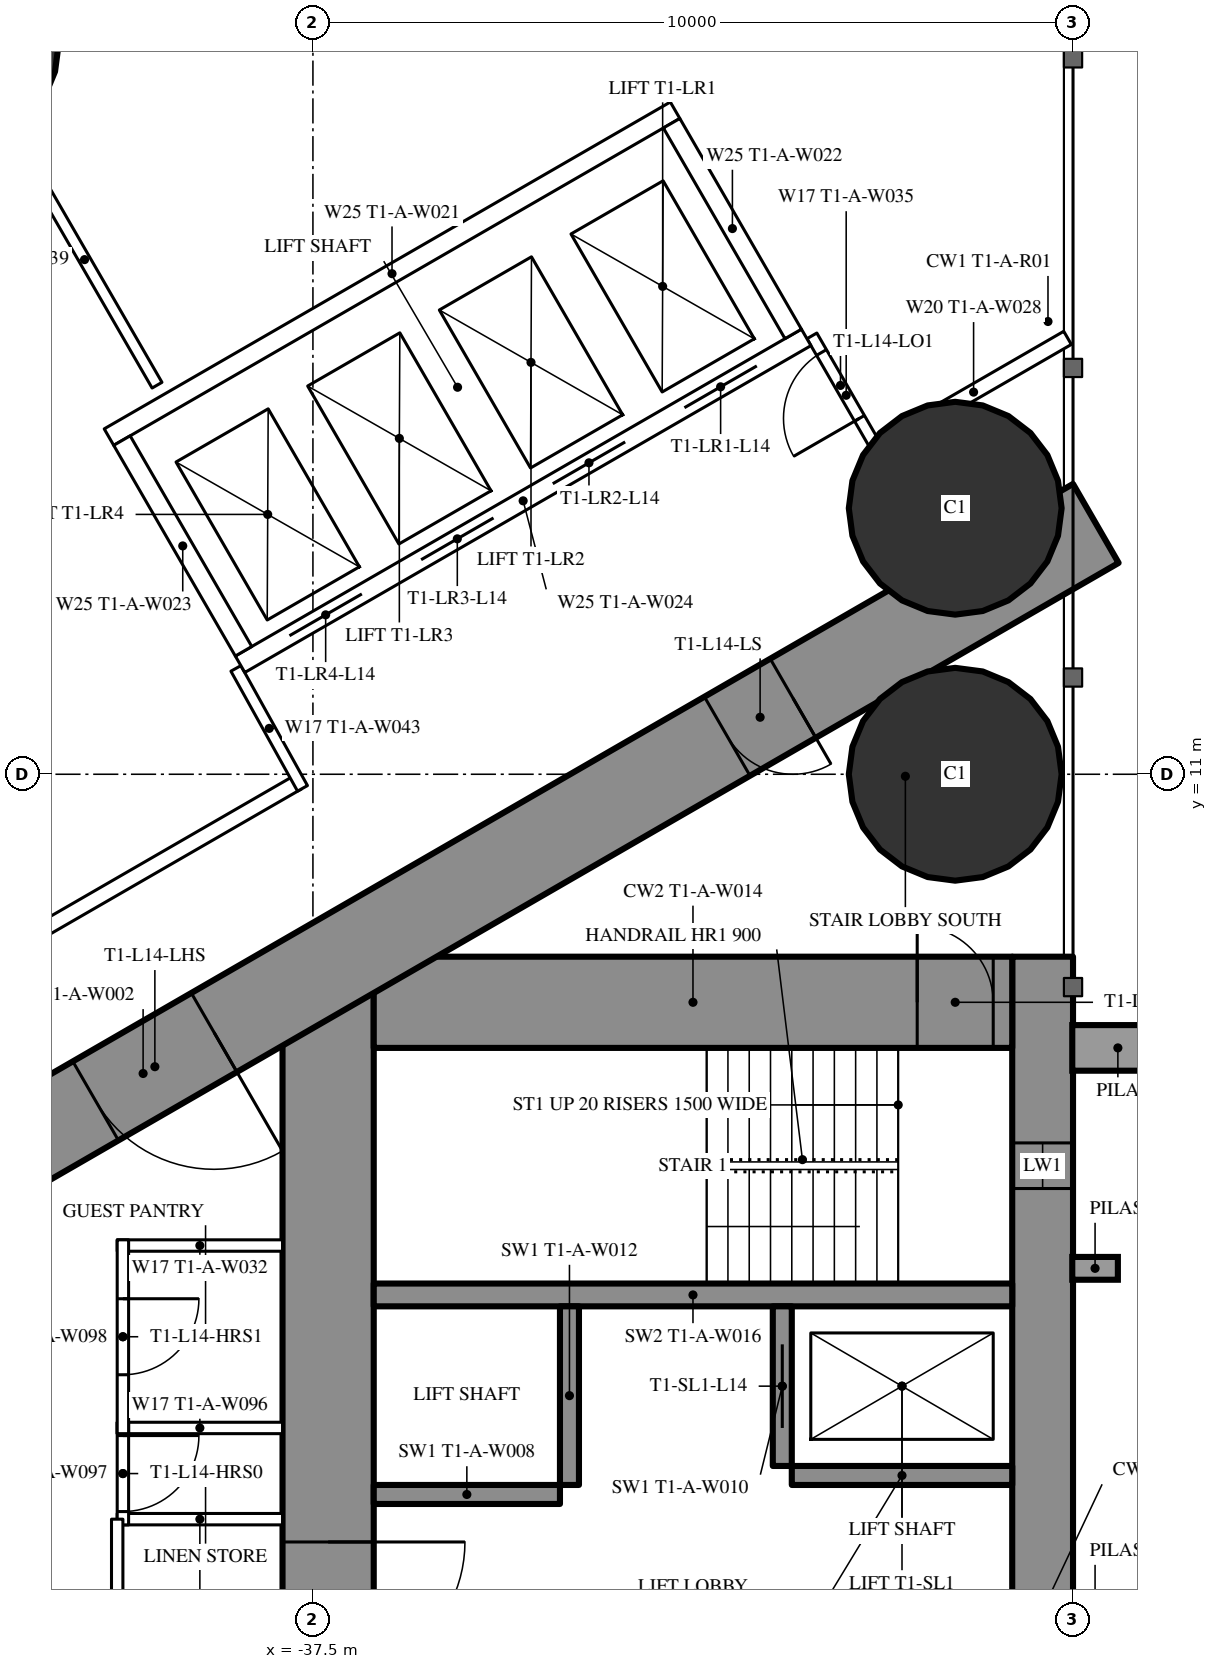
"""IFC4 building model, lengths in metres.
Left out: names, types, materials, properties, quantities, classifications, styles, units other than length and angle.
Written with IfcOpenShell. Run it as: python <this file> out.ifc"""

import sys

from ifc_helpers import new_model, si_unit, direction, frame, frame_2d, origin, origin_2d, place, context, subcontext, project, spatial, rectangle, hollow_circle, extrude, element, fill, save


model = new_model("IFC4")
c1 = context("Model", 3, precision=1e-05, world=origin(), true_north=direction((0.0, 1.0)))
c2 = subcontext(c1, "Body", "Model", "MODEL_VIEW")
j1 = project(units=[si_unit("LENGTHUNIT", "METRE"), si_unit("PLANEANGLEUNIT", "RADIAN")], contexts=[c1])
p1 = place(None, origin())
s1 = spatial("IfcSite", under=j1, at=p1, CompositionType="ELEMENT")
p2 = place(p1, origin())
s2 = spatial("IfcBuilding", under=s1, at=p2, CompositionType="ELEMENT")
p3 = place(p2, frame((0.0, 0.0, 56.5)))
s3 = spatial("IfcBuildingStorey", under=s2, at=p3, CompositionType="ELEMENT", Elevation=56.5)
for number, where, z_axis, x_axis in (
    (1, (-29.05, 11.0, 0.0), (0.0, 0.0, 1.0), (1.0, 0.0, 0.0)),
    (2, (-29.05, 14.5, 0.0), (0.0, 0.0, 1.0), (1.0, 0.0, 0.0)),
    (3, (-42.245, 20.607, 0.0), (0.0, 0.0, 1.0), (1.0, 0.0, 0.0)),
):
    element("IfcColumn", number, at=place(p3, frame(where, z_axis=z_axis, x_axis=x_axis)), inside=s3, PredefinedType="COLUMN", context=c2, shape_type="SweptSolid", body=[
        extrude(hollow_circle(Radius=1.4, WallThickness=0.12, at=origin_2d()), origin(), (0.0, 0.0, 1.0), 3.5),
    ])
p4 = place(p3, frame((-27.9, 8.6, 0.0), z_axis=(0.0, 0.0, 1.0), x_axis=(0.0, -1.0, 0.0)))
e4 = element("IfcWall", 4, at=p4, inside=s3, PredefinedType="SHEAR", context=c2, shape_type="SweptSolid", body=[
    extrude(rectangle(XDim=17.2, YDim=0.8, at=frame_2d((8.6, 0.0))), origin(), (0.0, 0.0, 1.0), 3.5),
])
p5 = place(p4, frame((2.45, 0.0, 0.6)))
e5 = element("IfcOpeningElement", 5, at=p5, cuts=e4, PredefinedType="OPENING", context=c2, shape_type="SweptSolid", body=[
    extrude(rectangle(XDim=0.6, YDim=2.1, at=frame_2d((0.3, 1.05))), frame((0.0, 0.41, 0.0), z_axis=(0.0, -1.0, 0.0), x_axis=(1.0, 0.0, 0.0)), (0.0, 0.0, 1.0), 0.82),
])
p6 = place(p4, frame((14.15, 0.0, 0.6)))
e6 = element("IfcOpeningElement", 6, at=p6, cuts=e4, PredefinedType="OPENING", context=c2, shape_type="SweptSolid", body=[
    extrude(rectangle(XDim=0.6, YDim=2.1, at=frame_2d((0.3, 1.05))), frame((0.0, 0.41, 0.0), z_axis=(0.0, -1.0, 0.0), x_axis=(1.0, 0.0, 0.0)), (0.0, 0.0, 1.0), 0.82),
])
p7 = place(p3, frame((-37.3, 8.6, 0.0), z_axis=(0.0, 0.0, 1.0), x_axis=(0.0, -1.0, 0.0)))
e7 = element("IfcWall", 7, at=p7, inside=s3, PredefinedType="SHEAR", context=c2, shape_type="SweptSolid", body=[
    extrude(rectangle(XDim=17.2, YDim=1.2, at=frame_2d((8.6, 0.0))), origin(), (0.0, 0.0, 1.0), 3.5),
])
p8 = place(p7, frame((7.7, 0.0, 0.0)))
e8 = element("IfcOpeningElement", 8, at=p8, cuts=e7, PredefinedType="OPENING", context=c2, shape_type="SweptSolid", body=[
    extrude(rectangle(XDim=1.8, YDim=2.2, at=frame_2d((0.9, 1.1))), frame((0.0, 0.61, 0.0), z_axis=(0.0, -1.0, 0.0), x_axis=(1.0, 0.0, 0.0)), (0.0, 0.0, 1.0), 1.22),
])
p9 = place(p3, frame((-28.3, 8.0, 0.0), z_axis=(0.0, 0.0, 1.0), x_axis=(-1.0, 0.0, 0.0)))
e9 = element("IfcWall", 9, at=p9, inside=s3, PredefinedType="SHEAR", context=c2, shape_type="SweptSolid", body=[
    extrude(rectangle(XDim=8.4, YDim=1.2, at=frame_2d((4.2, 0.0))), origin(), (0.0, 0.0, 1.0), 3.5),
])
p10 = place(p9, frame((0.25, 0.0, 0.0)))
e10 = element("IfcOpeningElement", 10, at=p10, cuts=e9, PredefinedType="OPENING", context=c2, shape_type="SweptSolid", body=[
    extrude(rectangle(XDim=1.0, YDim=2.2, at=frame_2d((0.5, 1.1))), frame((0.0, 0.61, 0.0), z_axis=(0.0, -1.0, 0.0), x_axis=(1.0, 0.0, 0.0)), (0.0, 0.0, 1.0), 1.22),
])
p11 = place(p3, frame((-28.3, 4.15, 0.0), z_axis=(0.0, 0.0, 1.0), x_axis=(-1.0, 0.0, 0.0)))
e11 = element("IfcWall", 11, at=p11, inside=s3, PredefinedType="SHEAR", context=c2, shape_type="SweptSolid", body=[
    extrude(rectangle(XDim=8.4, YDim=0.3, at=frame_2d((4.2, 0.0))), origin(), (0.0, 0.0, 1.0), 3.5),
])
p12 = place(p3, frame((-31.325, 4.0, 0.0), z_axis=(0.0, 0.0, 1.0), x_axis=(0.0, -1.0, 0.0)))
e12 = element("IfcWall", 12, at=p12, inside=s3, PredefinedType="SHEAR", context=c2, shape_type="SweptSolid", body=[
    extrude(rectangle(XDim=2.1, YDim=0.25, at=frame_2d((1.05, 0.0))), origin(), (0.0, 0.0, 1.0), 3.5),
])
p13 = place(p12, frame((0.5, 0.0, 0.0)))
e13 = element("IfcOpeningElement", 13, at=p13, cuts=e12, PredefinedType="OPENING", context=c2, shape_type="SweptSolid", body=[
    extrude(rectangle(XDim=1.1, YDim=2.2, at=frame_2d((0.55, 1.1))), frame((0.0, 0.135, 0.0), z_axis=(0.0, -1.0, 0.0), x_axis=(1.0, 0.0, 0.0)), (0.0, 0.0, 1.0), 0.27),
])
p14 = place(p3, frame((-34.125, 4.0, 0.0), z_axis=(0.0, 0.0, 1.0), x_axis=(0.0, -1.0, 0.0)))
e14 = element("IfcWall", 14, at=p14, inside=s3, PredefinedType="SHEAR", context=c2, shape_type="SweptSolid", body=[
    extrude(rectangle(XDim=2.35, YDim=0.25, at=frame_2d((1.175, 0.0))), origin(), (0.0, 0.0, 1.0), 3.5),
])
p15 = place(p3, frame((-28.3, 1.775, 0.0), z_axis=(0.0, 0.0, 1.0), x_axis=(-1.0, 0.0, 0.0)))
e15 = element("IfcWall", 15, at=p15, inside=s3, PredefinedType="SHEAR", context=c2, shape_type="SweptSolid", body=[
    extrude(rectangle(XDim=2.9, YDim=0.25, at=frame_2d((1.45, 0.0))), origin(), (0.0, 0.0, 1.0), 3.5),
])
p16 = place(p3, frame((-34.25, 1.525, 0.0), z_axis=(0.0, 0.0, 1.0), x_axis=(-1.0, 0.0, 0.0)))
e16 = element("IfcWall", 16, at=p16, inside=s3, PredefinedType="SHEAR", context=c2, shape_type="SweptSolid", body=[
    extrude(rectangle(XDim=2.45, YDim=0.25, at=frame_2d((1.225, 0.0))), origin(), (0.0, 0.0, 1.0), 3.5),
])
p17 = place(p3, frame((-27.2, 14.3, 0.0), z_axis=(0.0, 0.0, 1.0), x_axis=(-0.866026593062, -0.499997940104, 0.0)))
e17 = element("IfcWall", 17, at=p17, inside=s3, PredefinedType="SHEAR", context=c2, shape_type="SweptSolid", body=[
    extrude(rectangle(XDim=28.946, YDim=1.2, at=frame_2d((14.473, 0.0))), origin(), (0.0, 0.0, 1.0), 3.5),
])
p18 = place(p17, frame((4.6, 0.0, 0.0)))
e18 = element("IfcOpeningElement", 18, at=p18, cuts=e17, PredefinedType="OPENING", context=c2, shape_type="SweptSolid", body=[
    extrude(rectangle(XDim=1.0, YDim=2.2, at=frame_2d((0.5, 1.1))), frame((0.0, 0.61, 0.0), z_axis=(0.0, -1.0, 0.0), x_axis=(1.0, 0.0, 0.0)), (0.0, 0.0, 1.0), 1.22),
])
p19 = place(p17, frame((13.395, 0.0, 0.0)))
e19 = element("IfcOpeningElement", 19, at=p19, cuts=e17, PredefinedType="OPENING", context=c2, shape_type="SweptSolid", body=[
    extrude(rectangle(XDim=1.8, YDim=2.2, at=frame_2d((0.9, 1.1))), frame((0.0, 0.61, 0.0), z_axis=(0.0, -1.0, 0.0), x_axis=(1.0, 0.0, 0.0)), (0.0, 0.0, 1.0), 1.22),
])
p20 = place(p3, frame((-39.551, 16.119, 0.0), z_axis=(0.0, 0.0, 1.0), x_axis=(-0.500014214979, 0.866017196607, 0.0)))
e20 = element("IfcWall", 20, at=p20, inside=s3, PredefinedType="PARTITIONING", context=c2, shape_type="SweptSolid", body=[
    extrude(rectangle(XDim=3.815, YDim=0.15, at=frame_2d((1.907, 0.0))), origin(), (0.0, 0.0, 1.0), 3.25),
])
p21 = place(p3, frame((-27.572, 16.741, 0.0), z_axis=(0.0, 0.0, 1.0), x_axis=(-0.866034618596, -0.499984039138, 0.0)))
e21 = element("IfcWall", 21, at=p21, inside=s3, PredefinedType="PARTITIONING", context=c2, shape_type="SweptSolid", body=[
    extrude(rectangle(XDim=2.854, YDim=0.2, at=frame_2d((1.427, 0.0))), origin(), (0.0, 0.0, 1.0), 3.25),
])
p22 = place(p3, frame((-37.7, 10.894, 0.0), z_axis=(0.0, 0.0, 1.0), x_axis=(-0.866027905338, -0.499995667157, 0.0)))
e22 = element("IfcWall", 22, at=p22, inside=s3, PredefinedType="PARTITIONING", context=c2, shape_type="SweptSolid", body=[
    extrude(rectangle(XDim=21.787, YDim=0.2, at=frame_2d((10.894, 0.0))), origin(), (0.0, 0.0, 1.0), 3.25),
])
p23 = place(p22, frame((20.237, 0.0, 0.0)))
e23 = element("IfcOpeningElement", 23, at=p23, cuts=e22, PredefinedType="OPENING", context=c2, shape_type="SweptSolid", body=[
    extrude(rectangle(XDim=0.95, YDim=2.2, at=frame_2d((0.475, 1.1))), frame((0.0, 0.11, 0.0), z_axis=(0.0, -1.0, 0.0), x_axis=(1.0, 0.0, 0.0)), (0.0, 0.0, 1.0), 0.22),
])
p24 = place(p22, frame((7.73, 0.0, 0.0)))
e24 = element("IfcOpeningElement", 24, at=p24, cuts=e22, PredefinedType="OPENING", context=c2, shape_type="SweptSolid", body=[
    extrude(rectangle(XDim=0.95, YDim=2.2, at=frame_2d((0.475, 1.1))), frame((0.0, 0.11, 0.0), z_axis=(0.0, -1.0, 0.0), x_axis=(1.0, 0.0, 0.0)), (0.0, 0.0, 1.0), 0.22),
])
p25 = place(p3, frame((-38.513, 12.392, 0.0), z_axis=(0.0, 0.0, 1.0), x_axis=(0.485585508183, -0.874189175317, 0.0)))
e25 = element("IfcWall", 25, at=p25, inside=s3, PredefinedType="PARTITIONING", context=c2, shape_type="SweptSolid", body=[
    extrude(rectangle(XDim=1.805, YDim=0.15, at=frame_2d((0.902, 0.0))), origin(), (0.0, 0.0, 1.0), 3.25),
])
p26 = place(p3, frame((-30.033, 15.205, 0.0), z_axis=(0.0, 0.0, 1.0), x_axis=(-0.499980071345, 0.866036909293, 0.0)))
e26 = element("IfcWall", 26, at=p26, inside=s3, PredefinedType="PARTITIONING", context=c2, shape_type="SweptSolid", body=[
    extrude(rectangle(XDim=1.805, YDim=0.15, at=frame_2d((0.902, 0.0))), origin(), (0.0, 0.0, 1.0), 3.25),
])
p27 = place(p26, frame((0.552, 0.0, 0.0)))
e27 = element("IfcOpeningElement", 27, at=p27, cuts=e26, PredefinedType="OPENING", context=c2, shape_type="SweptSolid", body=[
    extrude(rectangle(XDim=1.0, YDim=2.2, at=frame_2d((0.5, 1.1))), frame((0.0, 0.085, 0.0), z_axis=(0.0, -1.0, 0.0), x_axis=(1.0, 0.0, 0.0)), (0.0, 0.0, 1.0), 0.17),
])
for number, where, z_axis, x_axis in (
    (28, (-37.9, 1.2, 0.0), (0.0, 0.0, 1.0), (-1.0, 0.0, 0.0)),
    (29, (-37.9, 2.4, 0.0), (0.0, 0.0, 1.0), (-1.0, 0.0, 0.0)),
    (30, (-37.9, 4.8, 0.0), (0.0, 0.0, 1.0), (-1.0, 0.0, 0.0)),
):
    element("IfcWall", number, at=place(p3, frame(where, z_axis=z_axis, x_axis=x_axis)), inside=s3, PredefinedType="PARTITIONING", context=c2, shape_type="SweptSolid", body=[
        extrude(rectangle(XDim=2.175, YDim=0.15, at=frame_2d((1.087, 0.0))), origin(), (0.0, 0.0, 1.0), 3.25),
    ])
p28 = place(p3, frame((-40.0, 2.475, 0.0), z_axis=(0.0, 0.0, 1.0), x_axis=(0.0, -1.0, 0.0)))
e31 = element("IfcWall", 31, at=p28, inside=s3, PredefinedType="PARTITIONING", context=c2, shape_type="SweptSolid", body=[
    extrude(rectangle(XDim=1.35, YDim=0.15, at=frame_2d((0.675, 0.0))), origin(), (0.0, 0.0, 1.0), 3.25),
])
p29 = place(p28, frame((0.175, 0.0, 0.0)))
e32 = element("IfcOpeningElement", 32, at=p29, cuts=e31, PredefinedType="OPENING", context=c2, shape_type="SweptSolid", body=[
    extrude(rectangle(XDim=1.0, YDim=2.2, at=frame_2d((0.5, 1.1))), frame((0.0, 0.085, 0.0), z_axis=(0.0, -1.0, 0.0), x_axis=(1.0, 0.0, 0.0)), (0.0, 0.0, 1.0), 0.17),
])
p30 = place(p3, frame((-40.0, 4.875, 0.0), z_axis=(0.0, 0.0, 1.0), x_axis=(0.0, -1.0, 0.0)))
e33 = element("IfcWall", 33, at=p30, inside=s3, PredefinedType="PARTITIONING", context=c2, shape_type="SweptSolid", body=[
    extrude(rectangle(XDim=2.55, YDim=0.15, at=frame_2d((1.275, 0.0))), origin(), (0.0, 0.0, 1.0), 3.25),
])
p31 = place(p30, frame((0.775, 0.0, 0.0)))
e34 = element("IfcOpeningElement", 34, at=p31, cuts=e33, PredefinedType="OPENING", context=c2, shape_type="SweptSolid", body=[
    extrude(rectangle(XDim=1.0, YDim=2.2, at=frame_2d((0.5, 1.1))), frame((0.0, 0.085, 0.0), z_axis=(0.0, -1.0, 0.0), x_axis=(1.0, 0.0, 0.0)), (0.0, 0.0, 1.0), 0.17),
])
p32 = place(p3, frame((-40.075, 1.2, 0.0), z_axis=(0.0, 0.0, 1.0), x_axis=(0.0, -1.0, 0.0)))
e35 = element("IfcWall", 35, at=p32, inside=s3, PredefinedType="PARTITIONING", context=c2, shape_type="SweptSolid", body=[
    extrude(rectangle(XDim=7.374, YDim=0.15, at=frame_2d((3.687, 0.0))), origin(), (0.0, 0.0, 1.0), 3.25),
])
p33 = place(p32, frame((2.787, 0.0, 0.0)))
e36 = element("IfcOpeningElement", 36, at=p33, cuts=e35, PredefinedType="OPENING", context=c2, shape_type="SweptSolid", body=[
    extrude(rectangle(XDim=1.8, YDim=2.2, at=frame_2d((0.9, 1.1))), frame((0.0, 0.085, 0.0), z_axis=(0.0, -1.0, 0.0), x_axis=(1.0, 0.0, 0.0)), (0.0, 0.0, 1.0), 0.17),
])
p34 = place(p3, frame((-31.01, 16.747, 0.0), z_axis=(0.0, 0.0, 1.0), x_axis=(-0.866028165386, -0.499995216735, 0.0)))
e37 = element("IfcWall", 37, at=p34, inside=s3, PredefinedType="PARTITIONING", context=c2, shape_type="SweptSolid", body=[
    extrude(rectangle(XDim=8.6, YDim=0.25, at=frame_2d((4.3, 0.0))), origin(), (0.0, 0.0, 1.0), 3.25),
])
p35 = place(p34, frame((0.75, 0.0, 0.0)))
e38 = element("IfcOpeningElement", 38, at=p35, cuts=e37, PredefinedType="OPENING", context=c2, shape_type="SweptSolid", body=[
    extrude(rectangle(XDim=1.1, YDim=2.2, at=frame_2d((0.55, 1.1))), frame((0.0, 0.135, 0.0), z_axis=(0.0, -1.0, 0.0), x_axis=(1.0, 0.0, 0.0)), (0.0, 0.0, 1.0), 0.27),
])
p36 = place(p34, frame((2.75, 0.0, 0.0)))
e39 = element("IfcOpeningElement", 39, at=p36, cuts=e37, PredefinedType="OPENING", context=c2, shape_type="SweptSolid", body=[
    extrude(rectangle(XDim=1.1, YDim=2.2, at=frame_2d((0.55, 1.1))), frame((0.0, 0.135, 0.0), z_axis=(0.0, -1.0, 0.0), x_axis=(1.0, 0.0, 0.0)), (0.0, 0.0, 1.0), 0.27),
])
p37 = place(p34, frame((4.75, 0.0, 0.0)))
e40 = element("IfcOpeningElement", 40, at=p37, cuts=e37, PredefinedType="OPENING", context=c2, shape_type="SweptSolid", body=[
    extrude(rectangle(XDim=1.1, YDim=2.2, at=frame_2d((0.55, 1.1))), frame((0.0, 0.135, 0.0), z_axis=(0.0, -1.0, 0.0), x_axis=(1.0, 0.0, 0.0)), (0.0, 0.0, 1.0), 0.27),
])
p38 = place(p34, frame((6.75, 0.0, 0.0)))
e41 = element("IfcOpeningElement", 41, at=p38, cuts=e37, PredefinedType="OPENING", context=c2, shape_type="SweptSolid", body=[
    extrude(rectangle(XDim=1.1, YDim=2.2, at=frame_2d((0.55, 1.1))), frame((0.0, 0.135, 0.0), z_axis=(0.0, -1.0, 0.0), x_axis=(1.0, 0.0, 0.0)), (0.0, 0.0, 1.0), 0.27),
])
p39 = place(p3, frame((-32.736, 19.736, 0.0), z_axis=(0.0, 0.0, 1.0), x_axis=(-0.866028165386, -0.499995216735, 0.0)))
e42 = element("IfcWall", 42, at=p39, inside=s3, PredefinedType="PARTITIONING", context=c2, shape_type="SweptSolid", body=[
    extrude(rectangle(XDim=8.6, YDim=0.25, at=frame_2d((4.3, 0.0))), origin(), (0.0, 0.0, 1.0), 3.25),
])
p40 = place(p3, frame((-31.181, 16.793, 0.0), z_axis=(0.0, 0.0, 1.0), x_axis=(-0.499929347863, 0.866066190972, 0.0)))
e43 = element("IfcWall", 43, at=p40, inside=s3, PredefinedType="PARTITIONING", context=c2, shape_type="SweptSolid", body=[
    extrude(rectangle(XDim=3.201, YDim=0.25, at=frame_2d((1.6, 0.0))), origin(), (0.0, 0.0, 1.0), 3.25),
])
p41 = place(p3, frame((-38.413, 12.618, 0.0), z_axis=(0.0, 0.0, 1.0), x_axis=(-0.499872130319, 0.866099216793, 0.0)))
e44 = element("IfcWall", 44, at=p41, inside=s3, PredefinedType="PARTITIONING", context=c2, shape_type="SweptSolid", body=[
    extrude(rectangle(XDim=3.2, YDim=0.25, at=frame_2d((1.6, 0.0))), origin(), (0.0, 0.0, 1.0), 3.25),
])
p42 = place(p27, origin())
e45 = element("IfcDoor", 45, at=p42, inside=s3, OperationType="SINGLE_SWING_LEFT", PredefinedType="DOOR", context=c2, shape_type="SweptSolid", body=[
    extrude(rectangle(XDim=1.0, YDim=2.2, at=frame_2d((0.5, 1.1))), frame((0.0, 0.025, 0.0), z_axis=(0.0, -1.0, 0.0), x_axis=(1.0, 0.0, 0.0)), (0.0, 0.0, 1.0), 0.05),
])
fill(e27, e45)
p43 = place(p29, origin())
e46 = element("IfcDoor", 46, at=p43, inside=s3, OperationType="SINGLE_SWING_LEFT", PredefinedType="DOOR", context=c2, shape_type="SweptSolid", body=[
    extrude(rectangle(XDim=1.0, YDim=2.2, at=frame_2d((0.5, 1.1))), frame((0.0, 0.025, 0.0), z_axis=(0.0, -1.0, 0.0), x_axis=(1.0, 0.0, 0.0)), (0.0, 0.0, 1.0), 0.05),
])
fill(e32, e46)
p44 = place(p31, origin())
e47 = element("IfcDoor", 47, at=p44, inside=s3, OperationType="SINGLE_SWING_LEFT", PredefinedType="DOOR", context=c2, shape_type="SweptSolid", body=[
    extrude(rectangle(XDim=1.0, YDim=2.2, at=frame_2d((0.5, 1.1))), frame((0.0, 0.025, 0.0), z_axis=(0.0, -1.0, 0.0), x_axis=(1.0, 0.0, 0.0)), (0.0, 0.0, 1.0), 0.05),
])
fill(e34, e47)
p45 = place(p18, origin())
e48 = element("IfcDoor", 48, at=p45, inside=s3, OperationType="SINGLE_SWING_LEFT", PredefinedType="DOOR", context=c2, shape_type="SweptSolid", body=[
    extrude(rectangle(XDim=1.0, YDim=2.2, at=frame_2d((0.5, 1.1))), frame((0.0, 0.025, 0.0), z_axis=(0.0, -1.0, 0.0), x_axis=(1.0, 0.0, 0.0)), (0.0, 0.0, 1.0), 0.05),
])
fill(e18, e48)
p46 = place(p19, origin())
e49 = element("IfcDoor", 49, at=p46, inside=s3, OperationType="DOUBLE_DOOR_SINGLE_SWING", PredefinedType="DOOR", context=c2, shape_type="SweptSolid", body=[
    extrude(rectangle(XDim=1.8, YDim=2.2, at=frame_2d((0.9, 1.1))), frame((0.0, 0.025, 0.0), z_axis=(0.0, -1.0, 0.0), x_axis=(1.0, 0.0, 0.0)), (0.0, 0.0, 1.0), 0.05),
])
fill(e19, e49)
p47 = place(p8, origin())
e50 = element("IfcDoor", 50, at=p47, inside=s3, OperationType="DOUBLE_DOOR_SINGLE_SWING", PredefinedType="DOOR", context=c2, shape_type="SweptSolid", body=[
    extrude(rectangle(XDim=1.8, YDim=2.2, at=frame_2d((0.9, 1.1))), frame((0.0, 0.025, 0.0), z_axis=(0.0, -1.0, 0.0), x_axis=(1.0, 0.0, 0.0)), (0.0, 0.0, 1.0), 0.05),
])
fill(e8, e50)
p48 = place(p10, origin())
e51 = element("IfcDoor", 51, at=p48, inside=s3, OperationType="SINGLE_SWING_RIGHT", PredefinedType="DOOR", context=c2, shape_type="SweptSolid", body=[
    extrude(rectangle(XDim=1.0, YDim=2.2, at=frame_2d((0.5, 1.1))), frame((0.0, 0.025, 0.0), z_axis=(0.0, -1.0, 0.0), x_axis=(1.0, 0.0, 0.0)), (0.0, 0.0, 1.0), 0.05),
])
fill(e10, e51)
p49 = place(p13, origin())
e52 = element("IfcDoor", 52, at=p49, inside=s3, OperationType="SLIDING_TO_LEFT", PredefinedType="USERDEFINED", context=c2, shape_type="SweptSolid", body=[
    extrude(rectangle(XDim=1.1, YDim=2.2, at=frame_2d((0.55, 1.1))), frame((0.0, 0.025, 0.0), z_axis=(0.0, -1.0, 0.0), x_axis=(1.0, 0.0, 0.0)), (0.0, 0.0, 1.0), 0.05),
])
fill(e13, e52)
p50 = place(p35, origin())
e53 = element("IfcDoor", 53, at=p50, inside=s3, OperationType="DOUBLE_DOOR_SLIDING", PredefinedType="USERDEFINED", context=c2, shape_type="SweptSolid", body=[
    extrude(rectangle(XDim=1.1, YDim=2.2, at=frame_2d((0.55, 1.1))), frame((0.0, 0.025, 0.0), z_axis=(0.0, -1.0, 0.0), x_axis=(1.0, 0.0, 0.0)), (0.0, 0.0, 1.0), 0.05),
])
fill(e38, e53)
p51 = place(p36, origin())
e54 = element("IfcDoor", 54, at=p51, inside=s3, OperationType="DOUBLE_DOOR_SLIDING", PredefinedType="USERDEFINED", context=c2, shape_type="SweptSolid", body=[
    extrude(rectangle(XDim=1.1, YDim=2.2, at=frame_2d((0.55, 1.1))), frame((0.0, 0.025, 0.0), z_axis=(0.0, -1.0, 0.0), x_axis=(1.0, 0.0, 0.0)), (0.0, 0.0, 1.0), 0.05),
])
fill(e39, e54)
p52 = place(p37, origin())
e55 = element("IfcDoor", 55, at=p52, inside=s3, OperationType="DOUBLE_DOOR_SLIDING", PredefinedType="USERDEFINED", context=c2, shape_type="SweptSolid", body=[
    extrude(rectangle(XDim=1.1, YDim=2.2, at=frame_2d((0.55, 1.1))), frame((0.0, 0.025, 0.0), z_axis=(0.0, -1.0, 0.0), x_axis=(1.0, 0.0, 0.0)), (0.0, 0.0, 1.0), 0.05),
])
fill(e40, e55)
p53 = place(p38, origin())
e56 = element("IfcDoor", 56, at=p53, inside=s3, OperationType="DOUBLE_DOOR_SLIDING", PredefinedType="USERDEFINED", context=c2, shape_type="SweptSolid", body=[
    extrude(rectangle(XDim=1.1, YDim=2.2, at=frame_2d((0.55, 1.1))), frame((0.0, 0.025, 0.0), z_axis=(0.0, -1.0, 0.0), x_axis=(1.0, 0.0, 0.0)), (0.0, 0.0, 1.0), 0.05),
])
fill(e41, e56)
p54 = place(p5, origin())
e57 = element("IfcWindow", 57, at=p54, inside=s3, PartitioningType="SINGLE_PANEL", PredefinedType="WINDOW", context=c2, shape_type="SweptSolid", body=[
    extrude(rectangle(XDim=0.6, YDim=2.1, at=frame_2d((0.3, 1.05))), frame((0.0, 0.03, 0.0), z_axis=(0.0, -1.0, 0.0), x_axis=(1.0, 0.0, 0.0)), (0.0, 0.0, 1.0), 0.06),
])
fill(e5, e57)
save(model, sys.argv[1])
